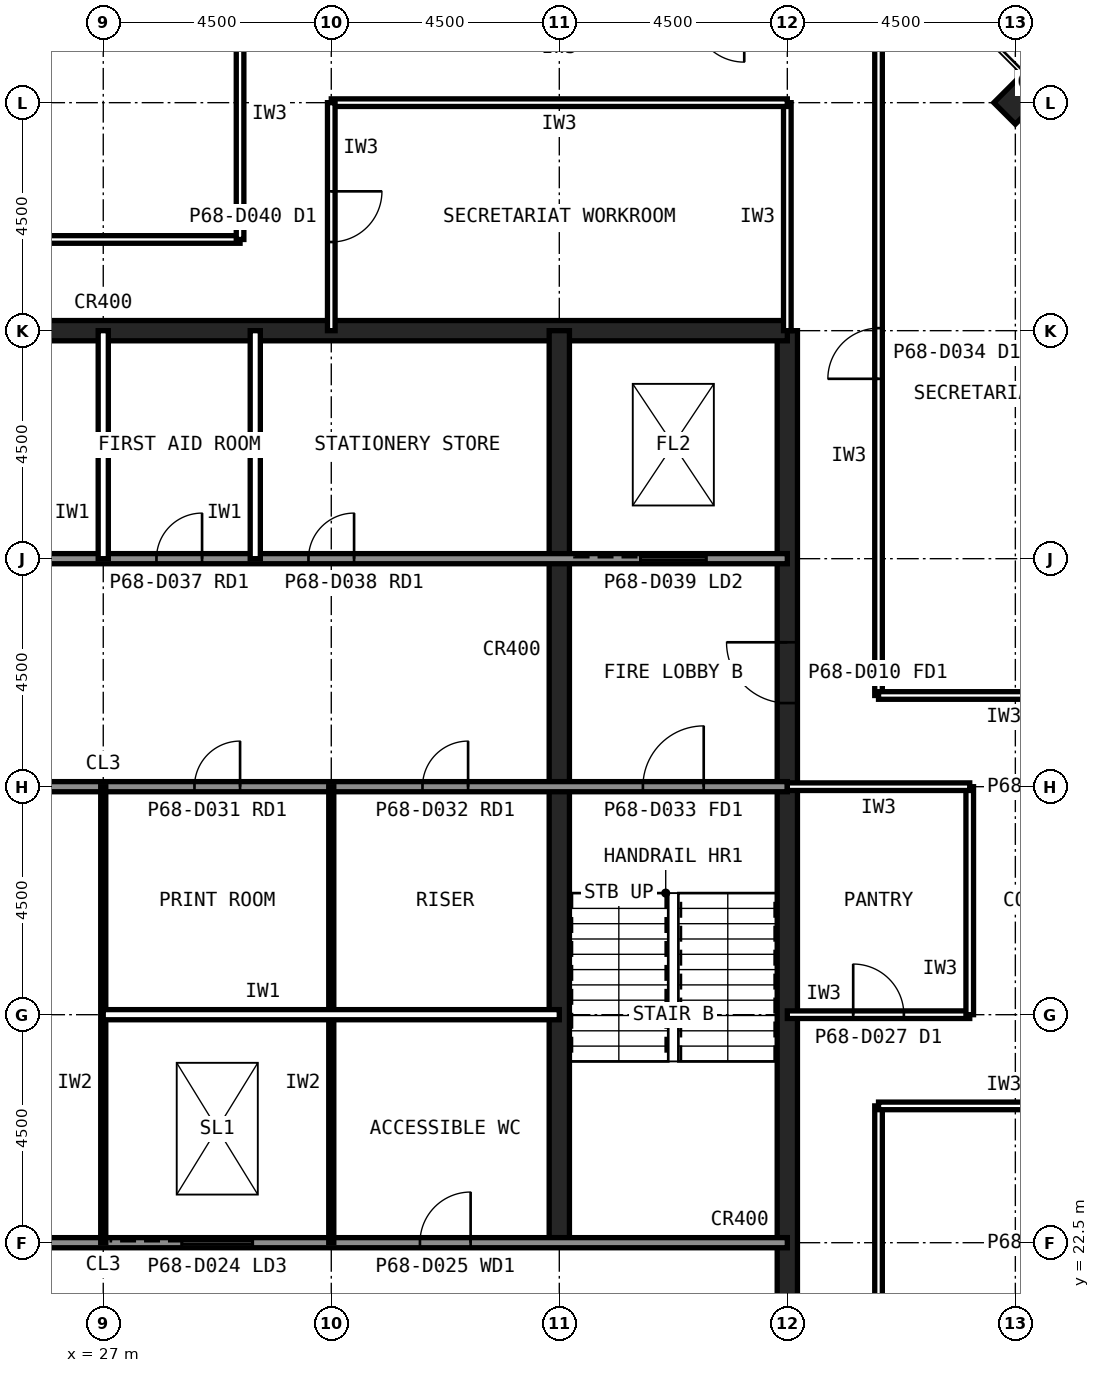
"""IFC4 building model, lengths in metres.
Left out: names, types, materials, properties, quantities, classifications, styles, units other than length and angle.
Written with IfcOpenShell. Run it as: python <this file> out.ifc"""

import sys

from ifc_helpers import new_model, si_unit, direction, frame, frame_2d, origin, origin_2d, place, context, subcontext, project, spatial, rectangle, hollow_rectangle, extrude, element, fill, save


model = new_model("IFC4")
c1 = context("Model", 3, precision=1e-05, world=origin(), true_north=direction((0.0, 1.0)))
c2 = subcontext(c1, "Body", "Model", "MODEL_VIEW")
j1 = project(units=[si_unit("LENGTHUNIT", "METRE"), si_unit("PLANEANGLEUNIT", "RADIAN")], contexts=[c1])
p1 = place(None, origin())
s1 = spatial("IfcSite", under=j1, at=p1, CompositionType="ELEMENT")
p2 = place(p1, origin())
s2 = spatial("IfcBuilding", under=s1, at=p2, CompositionType="ELEMENT")
p3 = place(p2, frame((0.0, 0.0, 286.6)))
s3 = spatial("IfcBuildingStorey", under=s2, at=p3, CompositionType="ELEMENT", Elevation=286.6)
p4 = place(p3, frame((45.0, 45.0, 0.0), z_axis=(0.0, 0.0, 1.0), x_axis=(0.707106781187, 0.707106781187, 0.0)))
e1 = element("IfcColumn", 1, at=p4, inside=s3, PredefinedType="COLUMN", context=c2, shape_type="SweptSolid", body=[
    extrude(hollow_rectangle(XDim=0.6, YDim=0.6, WallThickness=0.028, at=origin_2d()), origin(), (0.0, 0.0, 1.0), 4.0),
])
p5 = place(p3, frame((40.5, 13.5, 0.0), z_axis=(0.0, 0.0, 1.0), x_axis=(0.0, 1.0, 0.0)))
e2 = element("IfcWall", 2, at=p5, inside=s3, PredefinedType="SHEAR", context=c2, shape_type="SweptSolid", body=[
    extrude(rectangle(XDim=27.0, YDim=0.4, at=frame_2d((13.5, 0.0))), origin(), (0.0, 0.0, 1.0), 4.0),
])
p6 = place(p5, frame((5.85, 0.0, 0.0)))
e3 = element("IfcOpeningElement", 3, at=p6, cuts=e2, PredefinedType="OPENING", context=c2, shape_type="SweptSolid", body=[
    extrude(rectangle(XDim=1.8, YDim=2.1, at=frame_2d((0.9, 1.05))), frame((0.0, 0.21, 0.0), z_axis=(0.0, -1.0, 0.0), x_axis=(1.0, 0.0, 0.0)), (0.0, 0.0, 1.0), 0.42),
])
p7 = place(p5, frame((19.65, 0.0, 0.0)))
e4 = element("IfcOpeningElement", 4, at=p7, cuts=e2, PredefinedType="OPENING", context=c2, shape_type="SweptSolid", body=[
    extrude(rectangle(XDim=1.2, YDim=2.1, at=frame_2d((0.6, 1.05))), frame((0.0, 0.21, 0.0), z_axis=(0.0, -1.0, 0.0), x_axis=(1.0, 0.0, 0.0)), (0.0, 0.0, 1.0), 0.42),
])
p8 = place(p3, frame((40.5, 40.5, 0.0), z_axis=(0.0, 0.0, 1.0), x_axis=(-1.0, 0.0, 0.0)))
e5 = element("IfcWall", 5, at=p8, inside=s3, PredefinedType="SHEAR", context=c2, shape_type="SweptSolid", body=[
    extrude(rectangle(XDim=27.0, YDim=0.4, at=frame_2d((13.5, 0.0))), origin(), (0.0, 0.0, 1.0), 4.0),
])
p9 = place(p3, frame((36.0, 22.5, 0.0), z_axis=(0.0, 0.0, 1.0), x_axis=(0.0, 1.0, 0.0)))
e6 = element("IfcWall", 6, at=p9, inside=s3, PredefinedType="SHEAR", context=c2, shape_type="SweptSolid", body=[
    extrude(rectangle(XDim=18.0, YDim=0.4, at=frame_2d((9.0, 0.0))), origin(), (0.0, 0.0, 1.0), 4.0),
])
p10 = place(p3, frame((13.5, 36.0, 0.0), z_axis=(0.0, 0.0, 1.0), x_axis=(1.0, 0.0, 0.0)))
e7 = element("IfcWall", 7, at=p10, inside=s3, PredefinedType="SOLIDWALL", context=c2, shape_type="SweptSolid", body=[
    extrude(rectangle(XDim=27.0, YDim=0.2, at=frame_2d((13.5, 0.0))), origin(), (0.0, 0.0, 1.0), 3.84),
])
p11 = place(p10, frame((1.8, 0.0, 0.0)))
e8 = element("IfcOpeningElement", 8, at=p11, cuts=e7, PredefinedType="OPENING", context=c2, shape_type="SweptSolid", body=[
    extrude(rectangle(XDim=0.9, YDim=2.1, at=frame_2d((0.45, 1.05))), frame((0.0, 0.11, 0.0), z_axis=(0.0, -1.0, 0.0), x_axis=(1.0, 0.0, 0.0)), (0.0, 0.0, 1.0), 0.22),
])
p12 = place(p10, frame((5.55, 0.0, 0.0)))
e9 = element("IfcOpeningElement", 9, at=p12, cuts=e7, PredefinedType="OPENING", context=c2, shape_type="SweptSolid", body=[
    extrude(rectangle(XDim=0.9, YDim=2.1, at=frame_2d((0.45, 1.05))), frame((0.0, 0.11, 0.0), z_axis=(0.0, -1.0, 0.0), x_axis=(1.0, 0.0, 0.0)), (0.0, 0.0, 1.0), 0.22),
])
p13 = place(p10, frame((14.55, 0.0, 0.0)))
e10 = element("IfcOpeningElement", 10, at=p13, cuts=e7, PredefinedType="OPENING", context=c2, shape_type="SweptSolid", body=[
    extrude(rectangle(XDim=0.9, YDim=2.1, at=frame_2d((0.45, 1.05))), frame((0.0, 0.11, 0.0), z_axis=(0.0, -1.0, 0.0), x_axis=(1.0, 0.0, 0.0)), (0.0, 0.0, 1.0), 0.22),
])
p14 = place(p10, frame((17.55, 0.0, 0.0)))
e11 = element("IfcOpeningElement", 11, at=p14, cuts=e7, PredefinedType="OPENING", context=c2, shape_type="SweptSolid", body=[
    extrude(rectangle(XDim=0.9, YDim=2.1, at=frame_2d((0.45, 1.05))), frame((0.0, 0.11, 0.0), z_axis=(0.0, -1.0, 0.0), x_axis=(1.0, 0.0, 0.0)), (0.0, 0.0, 1.0), 0.22),
])
p15 = place(p10, frame((24.1, 0.0, 0.0)))
e12 = element("IfcOpeningElement", 12, at=p15, cuts=e7, PredefinedType="OPENING", context=c2, shape_type="SweptSolid", body=[
    extrude(rectangle(XDim=1.3, YDim=2.2, at=frame_2d((0.65, 1.1))), frame((0.0, 0.11, 0.0), z_axis=(0.0, -1.0, 0.0), x_axis=(1.0, 0.0, 0.0)), (0.0, 0.0, 1.0), 0.22),
])
p16 = place(p3, frame((13.5, 22.5, 0.0), z_axis=(0.0, 0.0, 1.0), x_axis=(1.0, 0.0, 0.0)))
e13 = element("IfcWall", 13, at=p16, inside=s3, PredefinedType="SOLIDWALL", context=c2, shape_type="SweptSolid", body=[
    extrude(rectangle(XDim=27.0, YDim=0.2, at=frame_2d((13.5, 0.0))), origin(), (0.0, 0.0, 1.0), 3.84),
])
p17 = place(p16, frame((1.65, 0.0, 0.0)))
e14 = element("IfcOpeningElement", 14, at=p17, cuts=e13, PredefinedType="OPENING", context=c2, shape_type="SweptSolid", body=[
    extrude(rectangle(XDim=1.2, YDim=2.1, at=frame_2d((0.6, 1.05))), frame((0.0, 0.11, 0.0), z_axis=(0.0, -1.0, 0.0), x_axis=(1.0, 0.0, 0.0)), (0.0, 0.0, 1.0), 0.22),
])
p18 = place(p16, frame((6.025, 0.0, 0.0)))
e15 = element("IfcOpeningElement", 15, at=p18, cuts=e13, PredefinedType="OPENING", context=c2, shape_type="SweptSolid", body=[
    extrude(rectangle(XDim=1.0, YDim=2.1, at=frame_2d((0.5, 1.05))), frame((0.0, 0.11, 0.0), z_axis=(0.0, -1.0, 0.0), x_axis=(1.0, 0.0, 0.0)), (0.0, 0.0, 1.0), 0.22),
])
p19 = place(p16, frame((10.525, 0.0, 0.0)))
e16 = element("IfcOpeningElement", 16, at=p19, cuts=e13, PredefinedType="OPENING", context=c2, shape_type="SweptSolid", body=[
    extrude(rectangle(XDim=1.0, YDim=2.1, at=frame_2d((0.5, 1.05))), frame((0.0, 0.11, 0.0), z_axis=(0.0, -1.0, 0.0), x_axis=(1.0, 0.0, 0.0)), (0.0, 0.0, 1.0), 0.22),
])
p20 = place(p16, frame((19.75, 0.0, 0.0)))
e17 = element("IfcOpeningElement", 17, at=p20, cuts=e13, PredefinedType="OPENING", context=c2, shape_type="SweptSolid", body=[
    extrude(rectangle(XDim=1.0, YDim=2.1, at=frame_2d((0.5, 1.05))), frame((0.0, 0.11, 0.0), z_axis=(0.0, -1.0, 0.0), x_axis=(1.0, 0.0, 0.0)), (0.0, 0.0, 1.0), 0.22),
])
p21 = place(p16, frame((15.05, 0.0, 0.0)))
e18 = element("IfcOpeningElement", 18, at=p21, cuts=e13, PredefinedType="OPENING", context=c2, shape_type="SweptSolid", body=[
    extrude(rectangle(XDim=1.4, YDim=2.4, at=frame_2d((0.7, 1.2))), frame((0.0, 0.11, 0.0), z_axis=(0.0, -1.0, 0.0), x_axis=(1.0, 0.0, 0.0)), (0.0, 0.0, 1.0), 0.22),
])
p22 = place(p3, frame((13.5, 31.5, 0.0), z_axis=(0.0, 0.0, 1.0), x_axis=(1.0, 0.0, 0.0)))
e19 = element("IfcWall", 19, at=p22, inside=s3, PredefinedType="SOLIDWALL", context=c2, shape_type="SweptSolid", body=[
    extrude(rectangle(XDim=27.0, YDim=0.2, at=frame_2d((13.5, 0.0))), origin(), (0.0, 0.0, 1.0), 3.84),
])
p23 = place(p22, frame((24.15, 0.0, 0.0)))
e20 = element("IfcOpeningElement", 20, at=p23, cuts=e19, PredefinedType="OPENING", context=c2, shape_type="SweptSolid", body=[
    extrude(rectangle(XDim=1.2, YDim=2.1, at=frame_2d((0.6, 1.05))), frame((0.0, 0.11, 0.0), z_axis=(0.0, -1.0, 0.0), x_axis=(1.0, 0.0, 0.0)), (0.0, 0.0, 1.0), 0.22),
])
p24 = place(p22, frame((15.3, 0.0, 0.0)))
e21 = element("IfcOpeningElement", 21, at=p24, cuts=e19, PredefinedType="OPENING", context=c2, shape_type="SweptSolid", body=[
    extrude(rectangle(XDim=0.9, YDim=2.1, at=frame_2d((0.45, 1.05))), frame((0.0, 0.11, 0.0), z_axis=(0.0, -1.0, 0.0), x_axis=(1.0, 0.0, 0.0)), (0.0, 0.0, 1.0), 0.22),
])
p25 = place(p22, frame((19.8, 0.0, 0.0)))
e22 = element("IfcOpeningElement", 22, at=p25, cuts=e19, PredefinedType="OPENING", context=c2, shape_type="SweptSolid", body=[
    extrude(rectangle(XDim=0.9, YDim=2.1, at=frame_2d((0.45, 1.05))), frame((0.0, 0.11, 0.0), z_axis=(0.0, -1.0, 0.0), x_axis=(1.0, 0.0, 0.0)), (0.0, 0.0, 1.0), 0.22),
])
for number, where, z_axis, x_axis in (
    (23, (27.0, 36.0, 0.0), (0.0, 0.0, 1.0), (0.0, 1.0, 0.0)),
    (24, (30.0, 36.0, 0.0), (0.0, 0.0, 1.0), (0.0, 1.0, 0.0)),
):
    element("IfcWall", number, at=place(p3, frame(where, z_axis=z_axis, x_axis=x_axis)), inside=s3, PredefinedType="PARTITIONING", context=c2, shape_type="SweptSolid", body=[
        extrude(rectangle(XDim=4.5, YDim=0.2, at=frame_2d((2.25, 0.0))), origin(), (0.0, 0.0, 1.0), 3.84),
    ])
for number, where, z_axis, x_axis in (
    (25, (27.0, 22.5, 0.0), (0.0, 0.0, 1.0), (0.0, 1.0, 0.0)),
    (26, (31.5, 22.5, 0.0), (0.0, 0.0, 1.0), (0.0, 1.0, 0.0)),
):
    element("IfcWall", number, at=place(p3, frame(where, z_axis=z_axis, x_axis=x_axis)), inside=s3, PredefinedType="PLUMBINGWALL", context=c2, shape_type="SweptSolid", body=[
        extrude(rectangle(XDim=9.0, YDim=0.1, at=frame_2d((4.5, 0.0))), origin(), (0.0, 0.0, 1.0), 3.84),
    ])
p26 = place(p3, frame((27.0, 27.0, 0.0), z_axis=(0.0, 0.0, 1.0), x_axis=(1.0, 0.0, 0.0)))
e27 = element("IfcWall", 27, at=p26, inside=s3, PredefinedType="PARTITIONING", context=c2, shape_type="SweptSolid", body=[
    extrude(rectangle(XDim=9.0, YDim=0.2, at=frame_2d((4.5, 0.0))), origin(), (0.0, 0.0, 1.0), 3.84),
])
p27 = place(p3, frame((29.7, 42.3, 0.0), z_axis=(0.0, 0.0, 1.0), x_axis=(-1.0, 0.0, 0.0)))
e28 = element("IfcWall", 28, at=p27, inside=s3, PredefinedType="PARTITIONING", context=c2, shape_type="SweptSolid", body=[
    extrude(rectangle(XDim=18.0, YDim=0.15, at=frame_2d((9.0, 0.0))), origin(), (0.0, 0.0, 1.0), 3.84),
])
p28 = place(p27, frame((8.5, 0.0, 0.0)))
e29 = element("IfcOpeningElement", 29, at=p28, cuts=e28, PredefinedType="OPENING", context=c2, shape_type="SweptSolid", body=[
    extrude(rectangle(XDim=1.0, YDim=2.1, at=frame_2d((0.5, 1.05))), frame((0.0, 0.085, 0.0), z_axis=(0.0, -1.0, 0.0), x_axis=(1.0, 0.0, 0.0)), (0.0, 0.0, 1.0), 0.17),
])
p29 = place(p3, frame((42.3, 11.7, 0.0), z_axis=(0.0, 0.0, 1.0), x_axis=(0.0, 1.0, 0.0)))
e30 = element("IfcWall", 30, at=p29, inside=s3, PredefinedType="PARTITIONING", context=c2, shape_type="SweptSolid", body=[
    extrude(rectangle(XDim=13.5, YDim=0.15, at=frame_2d((6.75, 0.0))), origin(), (0.0, 0.0, 1.0), 3.84),
])
p30 = place(p29, frame((6.25, 0.0, 0.0)))
e31 = element("IfcOpeningElement", 31, at=p30, cuts=e30, PredefinedType="OPENING", context=c2, shape_type="SweptSolid", body=[
    extrude(rectangle(XDim=1.0, YDim=2.1, at=frame_2d((0.5, 1.05))), frame((0.0, 0.085, 0.0), z_axis=(0.0, -1.0, 0.0), x_axis=(1.0, 0.0, 0.0)), (0.0, 0.0, 1.0), 0.17),
])
for number, where, z_axis, x_axis in (
    (32, (29.7, 47.25, 0.0), (0.0, 0.0, 1.0), (0.0, -1.0, 0.0)),
    (33, (42.3, 25.2, 0.0), (0.0, 0.0, 1.0), (1.0, 0.0, 0.0)),
):
    element("IfcWall", number, at=place(p3, frame(where, z_axis=z_axis, x_axis=x_axis)), inside=s3, PredefinedType="PARTITIONING", context=c2, shape_type="SweptSolid", body=[
        extrude(rectangle(XDim=4.95, YDim=0.15, at=frame_2d((2.475, 0.0))), origin(), (0.0, 0.0, 1.0), 3.84),
    ])
p31 = place(p3, frame((42.3, 33.3, 0.0), z_axis=(0.0, 0.0, 1.0), x_axis=(0.0, 1.0, 0.0)))
e34 = element("IfcWall", 34, at=p31, inside=s3, PredefinedType="PARTITIONING", context=c2, shape_type="SweptSolid", body=[
    extrude(rectangle(XDim=13.5, YDim=0.15, at=frame_2d((6.75, 0.0))), origin(), (0.0, 0.0, 1.0), 3.84),
])
p32 = place(p31, frame((6.25, 0.0, 0.0)))
e35 = element("IfcOpeningElement", 35, at=p32, cuts=e34, PredefinedType="OPENING", context=c2, shape_type="SweptSolid", body=[
    extrude(rectangle(XDim=1.0, YDim=2.1, at=frame_2d((0.5, 1.05))), frame((0.0, 0.085, 0.0), z_axis=(0.0, -1.0, 0.0), x_axis=(1.0, 0.0, 0.0)), (0.0, 0.0, 1.0), 0.17),
])
p33 = place(p3, frame((47.25, 33.3, 0.0), z_axis=(0.0, 0.0, 1.0), x_axis=(-1.0, 0.0, 0.0)))
e36 = element("IfcWall", 36, at=p33, inside=s3, PredefinedType="PARTITIONING", context=c2, shape_type="SweptSolid", body=[
    extrude(rectangle(XDim=4.95, YDim=0.15, at=frame_2d((2.475, 0.0))), origin(), (0.0, 0.0, 1.0), 3.84),
])
p34 = place(p3, frame((40.5, 40.5, 0.0), z_axis=(0.0, 0.0, 1.0), x_axis=(0.0, 1.0, 0.0)))
e37 = element("IfcWall", 37, at=p34, inside=s3, PredefinedType="PARTITIONING", context=c2, shape_type="SweptSolid", body=[
    extrude(rectangle(XDim=4.5, YDim=0.15, at=frame_2d((2.25, 0.0))), origin(), (0.0, 0.0, 1.0), 2.989),
])
p35 = place(p3, frame((40.5, 45.0, 0.0), z_axis=(0.0, 0.0, 1.0), x_axis=(-1.0, 0.0, 0.0)))
e38 = element("IfcWall", 38, at=p35, inside=s3, PredefinedType="PARTITIONING", context=c2, shape_type="SweptSolid", body=[
    extrude(rectangle(XDim=9.0, YDim=0.15, at=frame_2d((4.5, 0.0))), origin(), (0.0, 0.0, 1.0), 3.84),
])
p36 = place(p3, frame((31.5, 45.0, 0.0), z_axis=(0.0, 0.0, 1.0), x_axis=(0.0, -1.0, 0.0)))
e39 = element("IfcWall", 39, at=p36, inside=s3, PredefinedType="PARTITIONING", context=c2, shape_type="SweptSolid", body=[
    extrude(rectangle(XDim=4.5, YDim=0.15, at=frame_2d((2.25, 0.0))), origin(), (0.0, 0.0, 1.0), 2.989),
])
p37 = place(p36, frame((1.75, 0.0, 0.0)))
e40 = element("IfcOpeningElement", 40, at=p37, cuts=e39, PredefinedType="OPENING", context=c2, shape_type="SweptSolid", body=[
    extrude(rectangle(XDim=1.0, YDim=2.1, at=frame_2d((0.5, 1.05))), frame((0.0, 0.085, 0.0), z_axis=(0.0, -1.0, 0.0), x_axis=(1.0, 0.0, 0.0)), (0.0, 0.0, 1.0), 0.17),
])
p38 = place(p3, frame((40.5, 27.0, 0.0), z_axis=(0.0, 0.0, 1.0), x_axis=(1.0, 0.0, 0.0)))
e41 = element("IfcWall", 41, at=p38, inside=s3, PredefinedType="PARTITIONING", context=c2, shape_type="SweptSolid", body=[
    extrude(rectangle(XDim=3.6, YDim=0.15, at=frame_2d((1.8, 0.0))), origin(), (0.0, 0.0, 1.0), 2.989),
])
p39 = place(p38, frame((1.3, 0.0, 0.0)))
e42 = element("IfcOpeningElement", 42, at=p39, cuts=e41, PredefinedType="OPENING", context=c2, shape_type="SweptSolid", body=[
    extrude(rectangle(XDim=1.0, YDim=2.1, at=frame_2d((0.5, 1.05))), frame((0.0, 0.085, 0.0), z_axis=(0.0, -1.0, 0.0), x_axis=(1.0, 0.0, 0.0)), (0.0, 0.0, 1.0), 0.17),
])
p40 = place(p3, frame((44.1, 27.0, 0.0), z_axis=(0.0, 0.0, 1.0), x_axis=(0.0, 1.0, 0.0)))
e43 = element("IfcWall", 43, at=p40, inside=s3, PredefinedType="PARTITIONING", context=c2, shape_type="SweptSolid", body=[
    extrude(rectangle(XDim=4.5, YDim=0.15, at=frame_2d((2.25, 0.0))), origin(), (0.0, 0.0, 1.0), 3.84),
])
p41 = place(p3, frame((44.1, 31.5, 0.0), z_axis=(0.0, 0.0, 1.0), x_axis=(-1.0, 0.0, 0.0)))
e44 = element("IfcWall", 44, at=p41, inside=s3, PredefinedType="PARTITIONING", context=c2, shape_type="SweptSolid", body=[
    extrude(rectangle(XDim=3.6, YDim=0.15, at=frame_2d((1.8, 0.0))), origin(), (0.0, 0.0, 1.0), 2.989),
])
p42 = place(p7, origin())
e45 = element("IfcDoor", 45, at=p42, inside=s3, OperationType="SINGLE_SWING_RIGHT", PredefinedType="DOOR", context=c2, shape_type="SweptSolid", body=[
    extrude(rectangle(XDim=1.2, YDim=2.1, at=frame_2d((0.6, 1.05))), frame((0.0, 0.025, 0.0), z_axis=(0.0, -1.0, 0.0), x_axis=(1.0, 0.0, 0.0)), (0.0, 0.0, 1.0), 0.05),
])
fill(e4, e45)
p43 = place(p23, origin())
e46 = element("IfcDoor", 46, at=p43, inside=s3, OperationType="SINGLE_SWING_RIGHT", PredefinedType="DOOR", context=c2, shape_type="SweptSolid", body=[
    extrude(rectangle(XDim=1.2, YDim=2.1, at=frame_2d((0.6, 1.05))), frame((0.0, 0.025, 0.0), z_axis=(0.0, -1.0, 0.0), x_axis=(1.0, 0.0, 0.0)), (0.0, 0.0, 1.0), 0.05),
])
fill(e20, e46)
p44 = place(p20, origin())
e47 = element("IfcDoor", 47, at=p44, inside=s3, OperationType="SINGLE_SWING_RIGHT", PredefinedType="DOOR", context=c2, shape_type="SweptSolid", body=[
    extrude(rectangle(XDim=1.0, YDim=2.1, at=frame_2d((0.5, 1.05))), frame((0.0, 0.025, 0.0), z_axis=(0.0, -1.0, 0.0), x_axis=(1.0, 0.0, 0.0)), (0.0, 0.0, 1.0), 0.05),
])
fill(e17, e47)
p45 = place(p24, origin())
e48 = element("IfcDoor", 48, at=p45, inside=s3, OperationType="SINGLE_SWING_RIGHT", PredefinedType="DOOR", context=c2, shape_type="SweptSolid", body=[
    extrude(rectangle(XDim=0.9, YDim=2.1, at=frame_2d((0.45, 1.05))), frame((0.0, 0.025, 0.0), z_axis=(0.0, -1.0, 0.0), x_axis=(1.0, 0.0, 0.0)), (0.0, 0.0, 1.0), 0.05),
])
fill(e21, e48)
p46 = place(p25, origin())
e49 = element("IfcDoor", 49, at=p46, inside=s3, OperationType="SINGLE_SWING_RIGHT", PredefinedType="DOOR", context=c2, shape_type="SweptSolid", body=[
    extrude(rectangle(XDim=0.9, YDim=2.1, at=frame_2d((0.45, 1.05))), frame((0.0, 0.025, 0.0), z_axis=(0.0, -1.0, 0.0), x_axis=(1.0, 0.0, 0.0)), (0.0, 0.0, 1.0), 0.05),
])
fill(e22, e49)
p47 = place(p13, origin())
e50 = element("IfcDoor", 50, at=p47, inside=s3, OperationType="SINGLE_SWING_RIGHT", PredefinedType="DOOR", context=c2, shape_type="SweptSolid", body=[
    extrude(rectangle(XDim=0.9, YDim=2.1, at=frame_2d((0.45, 1.05))), frame((0.0, 0.025, 0.0), z_axis=(0.0, -1.0, 0.0), x_axis=(1.0, 0.0, 0.0)), (0.0, 0.0, 1.0), 0.05),
])
fill(e10, e50)
p48 = place(p14, origin())
e51 = element("IfcDoor", 51, at=p48, inside=s3, OperationType="SINGLE_SWING_RIGHT", PredefinedType="DOOR", context=c2, shape_type="SweptSolid", body=[
    extrude(rectangle(XDim=0.9, YDim=2.1, at=frame_2d((0.45, 1.05))), frame((0.0, 0.025, 0.0), z_axis=(0.0, -1.0, 0.0), x_axis=(1.0, 0.0, 0.0)), (0.0, 0.0, 1.0), 0.05),
])
fill(e11, e51)
p49 = place(p15, origin())
e52 = element("IfcDoor", 52, at=p49, inside=s3, OperationType="SLIDING_TO_LEFT", PredefinedType="DOOR", context=c2, shape_type="SweptSolid", body=[
    extrude(rectangle(XDim=1.3, YDim=2.2, at=frame_2d((0.65, 1.1))), frame((0.0, 0.025, 0.0), z_axis=(0.0, -1.0, 0.0), x_axis=(1.0, 0.0, 0.0)), (0.0, 0.0, 1.0), 0.05),
])
fill(e12, e52)
p50 = place(p21, origin())
e53 = element("IfcDoor", 53, at=p50, inside=s3, OperationType="SLIDING_TO_LEFT", PredefinedType="DOOR", context=c2, shape_type="SweptSolid", body=[
    extrude(rectangle(XDim=1.4, YDim=2.4, at=frame_2d((0.7, 1.2))), frame((0.0, 0.025, 0.0), z_axis=(0.0, -1.0, 0.0), x_axis=(1.0, 0.0, 0.0)), (0.0, 0.0, 1.0), 0.05),
])
fill(e18, e53)
p51 = place(p32, origin())
e54 = element("IfcDoor", 54, at=p51, inside=s3, OperationType="SINGLE_SWING_LEFT", PredefinedType="DOOR", context=c2, shape_type="SweptSolid", body=[
    extrude(rectangle(XDim=1.0, YDim=2.1, at=frame_2d((0.5, 1.05))), frame((0.0, 0.025, 0.0), z_axis=(0.0, -1.0, 0.0), x_axis=(1.0, 0.0, 0.0)), (0.0, 0.0, 1.0), 0.05),
])
fill(e35, e54)
p52 = place(p37, origin())
e55 = element("IfcDoor", 55, at=p52, inside=s3, OperationType="SINGLE_SWING_LEFT", PredefinedType="DOOR", context=c2, shape_type="SweptSolid", body=[
    extrude(rectangle(XDim=1.0, YDim=2.1, at=frame_2d((0.5, 1.05))), frame((0.0, 0.025, 0.0), z_axis=(0.0, -1.0, 0.0), x_axis=(1.0, 0.0, 0.0)), (0.0, 0.0, 1.0), 0.05),
])
fill(e40, e55)
p53 = place(p39, origin())
e56 = element("IfcDoor", 56, at=p53, inside=s3, OperationType="SINGLE_SWING_LEFT", PredefinedType="DOOR", context=c2, shape_type="SweptSolid", body=[
    extrude(rectangle(XDim=1.0, YDim=2.1, at=frame_2d((0.5, 1.05))), frame((0.0, 0.025, 0.0), z_axis=(0.0, -1.0, 0.0), x_axis=(1.0, 0.0, 0.0)), (0.0, 0.0, 1.0), 0.05),
])
fill(e42, e56)
save(model, sys.argv[1])
